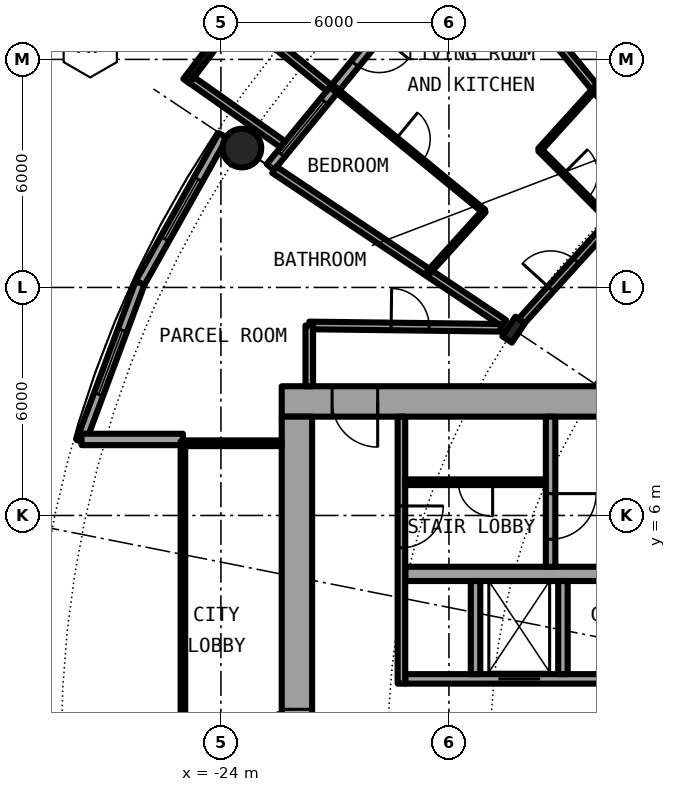
"""IFC4 building model, lengths in metres.
Left out: names, types, materials, properties, quantities, classifications, styles, units other than length and angle.
Written with IfcOpenShell. Run it as: python <this file> out.ifc"""

import sys

from ifc_helpers import new_model, si_unit, direction, frame, frame_2d, origin, origin_2d, place, context, subcontext, project, spatial, rectangle, circle, hollow_circle, i_section, extrude, element, fill, save


model = new_model("IFC4")
c1 = context("Model", 3, precision=1e-05, world=origin(), true_north=direction((0.0, 1.0)))
c2 = subcontext(c1, "Body", "Model", "MODEL_VIEW")
j1 = project(units=[si_unit("LENGTHUNIT", "METRE"), si_unit("PLANEANGLEUNIT", "RADIAN")], contexts=[c1])
p1 = place(None, origin())
s1 = spatial("IfcSite", under=j1, at=p1, CompositionType="ELEMENT")
p2 = place(p1, origin())
s2 = spatial("IfcBuilding", under=s1, at=p2, CompositionType="ELEMENT")
p3 = place(p2, frame((0.0, 0.0, 31.95)))
s3 = spatial("IfcBuildingStorey", under=s2, at=p3, CompositionType="ELEMENT", Elevation=31.95)
p4 = place(p3, frame((-23.448, 15.667, 0.0), z_axis=(0.0, 0.0, 1.0), x_axis=(1.0, 0.0, 0.0)))
e1 = element("IfcColumn", 1, at=p4, inside=s3, PredefinedType="COLUMN", context=c2, shape_type="SweptSolid", body=[
    extrude(hollow_circle(Radius=0.508, WallThickness=0.05, at=origin_2d()), origin(), (0.0, 0.0, 1.0), 3.05),
])
p5 = place(p3, frame((-16.297, 10.889, 0.0), z_axis=(0.0, 0.0, 1.0), x_axis=(-0.831469612303, 0.55557023302, 0.0)))
e2 = element("IfcColumn", 2, at=p5, inside=s3, PredefinedType="COLUMN", context=c2, shape_type="SweptSolid", body=[
    extrude(i_section(OverallWidth=0.305, OverallDepth=0.62, WebThickness=0.021, FlangeThickness=0.04, FilletRadius=0.027, at=origin_2d()), origin(), (0.0, 0.0, 1.0), 3.05),
])
p6 = place(p3, frame((-19.304, 19.304, 0.0), z_axis=(0.0, 0.0, 1.0), x_axis=(-0.634382322723, -0.773019449054, 0.0)))
e3 = element("IfcWall", 3, at=p6, inside=s3, PredefinedType="SOLIDWALL", context=c2, shape_type="SweptSolid", body=[
    extrude(rectangle(XDim=5.352, YDim=0.25, at=frame_2d((2.676, 0.0))), origin(), (0.0, 0.0, 1.0), 2.7),
])
p7 = place(p6, frame((0.841, 0.0, 0.0)))
e4 = element("IfcOpeningElement", 4, at=p7, cuts=e3, PredefinedType="OPENING", context=c2, shape_type="SweptSolid", body=[
    extrude(rectangle(XDim=1.0, YDim=2.2, at=frame_2d((0.5, 1.1))), frame((0.0, 0.135, 0.0), z_axis=(0.0, -1.0, 0.0), x_axis=(1.0, 0.0, 0.0)), (0.0, 0.0, 1.0), 0.27),
])
p8 = place(p6, frame((3.111, 0.0, 0.3)))
e5 = element("IfcOpeningElement", 5, at=p8, cuts=e3, PredefinedType="OPENING", context=c2, shape_type="SweptSolid", body=[
    extrude(rectangle(XDim=1.8, YDim=2.1, at=frame_2d((0.9, 1.05))), frame((0.0, 0.135, 0.0), z_axis=(0.0, -1.0, 0.0), x_axis=(1.0, 0.0, 0.0)), (0.0, 0.0, 1.0), 0.27),
])
p9 = place(p3, frame((-23.497, 19.289, -0.03), z_axis=(0.0, 0.0, 1.0), x_axis=(-0.60418752353, -0.796842165306, 0.0)))
e6 = element("IfcWall", 6, at=p9, inside=s3, PredefinedType="SOLIDWALL", context=c2, shape_type="SweptSolid", body=[
    extrude(rectangle(XDim=2.337, YDim=0.2, at=frame_2d((1.168, 0.0))), origin(), (0.0, 0.0, 1.0), 2.73),
])
p10 = place(p9, frame((0.128, 0.0, 0.33)))
e7 = element("IfcOpeningElement", 7, at=p10, cuts=e6, PredefinedType="OPENING", context=c2, shape_type="SweptSolid", body=[
    extrude(circle(Radius=1.04, at=frame_2d((1.04, 1.04))), frame((0.0, 0.11, 0.0), z_axis=(0.0, -1.0, 0.0), x_axis=(1.0, 0.0, 0.0)), (0.0, 0.0, 1.0), 0.22),
])
p11 = place(p3, frame((-21.155, 17.246, -0.03), z_axis=(0.0, 0.0, 1.0), x_axis=(-0.775179004516, 0.631741648902, 0.0)))
e8 = element("IfcWall", 8, at=p11, inside=s3, PredefinedType="SOLIDWALL", context=c2, shape_type="SweptSolid", body=[
    extrude(rectangle(XDim=3.006, YDim=0.2, at=frame_2d((1.503, 0.0))), origin(), (0.0, 0.0, 1.0), 2.73),
])
p12 = place(p3, frame((-22.37, 15.765, -0.03), z_axis=(0.0, 0.0, 1.0), x_axis=(-0.817256123454, 0.576274612209, 0.0)))
e9 = element("IfcWall", 9, at=p12, inside=s3, PredefinedType="SOLIDWALL", context=c2, shape_type="SweptSolid", body=[
    extrude(rectangle(XDim=2.933, YDim=0.2, at=frame_2d((1.466, 0.0))), origin(), (0.0, 0.0, 1.0), 2.73),
])
p13 = place(p3, frame((-23.946, 16.0, 0.0), z_axis=(0.0, 0.0, 1.0), x_axis=(-0.489696356642, -0.871893042919, 0.0)))
e10 = element("IfcWall", 10, at=p13, inside=s3, PredefinedType="SOLIDWALL", context=c2, shape_type="SweptSolid", body=[
    extrude(rectangle(XDim=4.454, YDim=0.25, at=frame_2d((2.227, 0.0))), origin(), (0.0, 0.0, 1.0), 2.7),
])
p14 = place(p13, frame((1.327, 0.0, 0.3)))
e11 = element("IfcOpeningElement", 11, at=p14, cuts=e10, PredefinedType="OPENING", context=c2, shape_type="SweptSolid", body=[
    extrude(rectangle(XDim=1.8, YDim=2.1, at=frame_2d((0.9, 1.05))), frame((0.0, 0.135, 0.0), z_axis=(0.0, -1.0, 0.0), x_axis=(1.0, 0.0, 0.0)), (0.0, 0.0, 1.0), 0.27),
])
p15 = place(p3, frame((-26.127, 12.117, 0.0), z_axis=(0.0, 0.0, 1.0), x_axis=(-0.349247811493, -0.937030397675, 0.0)))
e12 = element("IfcWall", 12, at=p15, inside=s3, PredefinedType="SOLIDWALL", context=c2, shape_type="SweptSolid", body=[
    extrude(rectangle(XDim=4.452, YDim=0.25, at=frame_2d((2.226, 0.0))), origin(), (0.0, 0.0, 1.0), 2.7),
])
p16 = place(p15, frame((1.327, 0.0, 0.3)))
e13 = element("IfcOpeningElement", 13, at=p16, cuts=e12, PredefinedType="OPENING", context=c2, shape_type="SweptSolid", body=[
    extrude(rectangle(XDim=1.8, YDim=2.1, at=frame_2d((0.9, 1.05))), frame((0.0, 0.135, 0.0), z_axis=(0.0, -1.0, 0.0), x_axis=(1.0, 0.0, 0.0)), (0.0, 0.0, 1.0), 0.27),
])
p17 = place(p3, frame((-25.0, 8.0, 0.0), z_axis=(0.0, 0.0, 1.0), x_axis=(-1.0, 0.0, 0.0)))
e14 = element("IfcWall", 14, at=p17, inside=s3, PredefinedType="SOLIDWALL", context=c2, shape_type="SweptSolid", body=[
    extrude(rectangle(XDim=2.667, YDim=0.3, at=frame_2d((1.333, 0.0))), origin(), (0.0, 0.0, 1.0), 2.7),
])
p18 = place(p3, frame((-8.2, 9.0, 0.0), z_axis=(0.0, 0.0, 1.0), x_axis=(-1.0, 0.0, 0.0)))
e15 = element("IfcWall", 15, at=p18, inside=s3, PredefinedType="SHEAR", context=c2, shape_type="SweptSolid", body=[
    extrude(rectangle(XDim=14.2, YDim=0.8, at=frame_2d((7.1, 0.0))), origin(), (0.0, 0.0, 1.0), 3.05),
])
p19 = place(p18, frame((11.675, 0.0, 0.0)))
e16 = element("IfcOpeningElement", 16, at=p19, cuts=e15, PredefinedType="OPENING", context=c2, shape_type="SweptSolid", body=[
    extrude(rectangle(XDim=1.2, YDim=2.3, at=frame_2d((0.6, 1.15))), frame((0.0, 0.41, 0.0), z_axis=(0.0, -1.0, 0.0), x_axis=(1.0, 0.0, 0.0)), (0.0, 0.0, 1.0), 0.82),
])
p20 = place(p3, frame((-22.0, -8.6, 0.0), z_axis=(0.0, 0.0, 1.0), x_axis=(0.0, 1.0, 0.0)))
e17 = element("IfcWall", 17, at=p20, inside=s3, PredefinedType="SHEAR", context=c2, shape_type="SweptSolid", body=[
    extrude(rectangle(XDim=17.2, YDim=0.8, at=frame_2d((8.6, 0.0))), origin(), (0.0, 0.0, 1.0), 3.05),
])
p21 = place(p20, frame((7.7, 0.0, 0.0)))
e18 = element("IfcOpeningElement", 18, at=p21, cuts=e17, PredefinedType="OPENING", context=c2, shape_type="SweptSolid", body=[
    extrude(rectangle(XDim=1.8, YDim=2.3, at=frame_2d((0.9, 1.15))), frame((0.0, 0.41, 0.0), z_axis=(0.0, -1.0, 0.0), x_axis=(1.0, 0.0, 0.0)), (0.0, 0.0, 1.0), 0.82),
])
p22 = place(p3, frame((-19.15, 1.7, 0.0), z_axis=(0.0, 0.0, 1.0), x_axis=(1.0, 0.0, 0.0)))
e19 = element("IfcWall", 19, at=p22, inside=s3, PredefinedType="SHEAR", context=c2, shape_type="SweptSolid", body=[
    extrude(rectangle(XDim=10.15, YDim=0.25, at=frame_2d((5.075, 0.0))), origin(), (0.0, 0.0, 1.0), 3.05),
])
p23 = place(p22, frame((2.45, 0.0, 0.0)))
e20 = element("IfcOpeningElement", 20, at=p23, cuts=e19, PredefinedType="OPENING", context=c2, shape_type="SweptSolid", body=[
    extrude(rectangle(XDim=1.1, YDim=2.3, at=frame_2d((0.55, 1.15))), frame((0.0, 0.135, 0.0), z_axis=(0.0, -1.0, 0.0), x_axis=(1.0, 0.0, 0.0)), (0.0, 0.0, 1.0), 0.27),
])
p24 = place(p22, frame((8.087, 0.0, 0.0)))
e21 = element("IfcOpeningElement", 21, at=p24, cuts=e19, PredefinedType="OPENING", context=c2, shape_type="SweptSolid", body=[
    extrude(rectangle(XDim=0.9, YDim=2.3, at=frame_2d((0.45, 1.15))), frame((0.0, 0.135, 0.0), z_axis=(0.0, -1.0, 0.0), x_axis=(1.0, 0.0, 0.0)), (0.0, 0.0, 1.0), 0.27),
])
p25 = place(p22, frame((5.075, 0.0, 0.0)))
e22 = element("IfcOpeningElement", 22, at=p25, cuts=e19, PredefinedType="OPENING", context=c2, shape_type="SweptSolid", body=[
    extrude(rectangle(XDim=0.9, YDim=2.3, at=frame_2d((0.45, 1.15))), frame((0.0, 0.135, 0.0), z_axis=(0.0, -1.0, 0.0), x_axis=(1.0, 0.0, 0.0)), (0.0, 0.0, 1.0), 0.27),
])
p26 = place(p3, frame((-9.0, 4.462, 0.0), z_axis=(0.0, 0.0, 1.0), x_axis=(-1.0, 0.0, 0.0)))
e23 = element("IfcWall", 23, at=p26, inside=s3, PredefinedType="SHEAR", context=c2, shape_type="SweptSolid", body=[
    extrude(rectangle(XDim=10.15, YDim=0.375, at=frame_2d((5.075, 0.0))), origin(), (0.0, 0.0, 1.0), 3.05),
])
p27 = place(p3, frame((-15.325, 8.6, 0.0), z_axis=(0.0, 0.0, 1.0), x_axis=(0.0, -1.0, 0.0)))
e24 = element("IfcWall", 24, at=p27, inside=s3, PredefinedType="SHEAR", context=c2, shape_type="SweptSolid", body=[
    extrude(rectangle(XDim=3.95, YDim=0.25, at=frame_2d((1.975, 0.0))), origin(), (0.0, 0.0, 1.0), 3.05),
])
p28 = place(p27, frame((2.025, 0.0, 0.0)))
e25 = element("IfcOpeningElement", 25, at=p28, cuts=e24, PredefinedType="OPENING", context=c2, shape_type="SweptSolid", body=[
    extrude(rectangle(XDim=1.2, YDim=2.3, at=frame_2d((0.6, 1.15))), frame((0.0, 0.135, 0.0), z_axis=(0.0, -1.0, 0.0), x_axis=(1.0, 0.0, 0.0)), (0.0, 0.0, 1.0), 0.27),
])
for number, where, z_axis, x_axis in (
    (26, (-15.0, 1.825, 0.0), (0.0, 0.0, 1.0), (0.0, 1.0, 0.0)),
    (27, (-17.3, 1.825, 0.0), (0.0, 0.0, 1.0), (0.0, 1.0, 0.0)),
):
    element("IfcWall", number, at=place(p3, frame(where, z_axis=z_axis, x_axis=x_axis)), inside=s3, PredefinedType="SOLIDWALL", context=c2, shape_type="SweptSolid", body=[
        extrude(rectangle(XDim=2.45, YDim=0.25, at=frame_2d((1.225, 0.0))), origin(), (0.0, 0.0, 1.0), 2.7),
    ])
p29 = place(p3, frame((-19.25, 8.6, 0.0), z_axis=(0.0, 0.0, 1.0), x_axis=(0.0, -1.0, 0.0)))
e28 = element("IfcWall", 28, at=p29, inside=s3, PredefinedType="SOLIDWALL", context=c2, shape_type="SweptSolid", body=[
    extrude(rectangle(XDim=7.025, YDim=0.2, at=frame_2d((3.513, 0.0))), origin(), (0.0, 0.0, 1.0), 2.7),
])
p30 = place(p29, frame((2.35, 0.0, 0.0)))
e29 = element("IfcOpeningElement", 29, at=p30, cuts=e28, PredefinedType="OPENING", context=c2, shape_type="SweptSolid", body=[
    extrude(rectangle(XDim=1.1, YDim=2.3, at=frame_2d((0.55, 1.15))), frame((0.0, 0.11, 0.0), z_axis=(0.0, -1.0, 0.0), x_axis=(1.0, 0.0, 0.0)), (0.0, 0.0, 1.0), 0.22),
])
p31 = place(p3, frame((-15.45, 6.875, 0.0), z_axis=(0.0, 0.0, 1.0), x_axis=(-1.0, 0.0, 0.0)))
e30 = element("IfcWall", 30, at=p31, inside=s3, PredefinedType="PARTITIONING", context=c2, shape_type="SweptSolid", body=[
    extrude(rectangle(XDim=3.7, YDim=0.15, at=frame_2d((1.85, 0.0))), origin(), (0.0, 0.0, 1.0), 2.7),
])
p32 = place(p31, frame((1.4, 0.0, 0.0)))
e31 = element("IfcOpeningElement", 31, at=p32, cuts=e30, PredefinedType="OPENING", context=c2, shape_type="SweptSolid", body=[
    extrude(rectangle(XDim=0.9, YDim=2.3, at=frame_2d((0.45, 1.15))), frame((0.0, 0.085, 0.0), z_axis=(0.0, -1.0, 0.0), x_axis=(1.0, 0.0, 0.0)), (0.0, 0.0, 1.0), 0.17),
])
p33 = place(p3, frame((-22.4, 7.9, 0.0), z_axis=(0.0, 0.0, 1.0), x_axis=(-1.0, 0.0, 0.0)))
e32 = element("IfcWall", 32, at=p33, inside=s3, PredefinedType="PARTITIONING", context=c2, shape_type="SweptSolid", body=[
    extrude(rectangle(XDim=2.54, YDim=0.15, at=frame_2d((1.27, 0.0))), origin(), (0.0, 0.0, 1.0), 2.7),
])
p34 = place(p3, frame((-25.0, 7.95, 0.0), z_axis=(0.0, 0.0, 1.0), x_axis=(0.0, -1.0, 0.0)))
e33 = element("IfcWall", 33, at=p34, inside=s3, PredefinedType="PARTITIONING", context=c2, shape_type="SweptSolid", body=[
    extrude(rectangle(XDim=15.9, YDim=0.12, at=frame_2d((7.95, 0.0))), origin(), (0.0, 0.0, 1.0), 2.7),
])
p35 = place(p34, frame((0.95, 0.0, 0.1)))
e34 = element("IfcOpeningElement", 34, at=p35, cuts=e33, PredefinedType="OPENING", context=c2, shape_type="SweptSolid", body=[
    extrude(rectangle(XDim=14.0, YDim=2.35, at=frame_2d((7.0, 1.175))), frame((0.0, 0.07, 0.0), z_axis=(0.0, -1.0, 0.0), x_axis=(1.0, 0.0, 0.0)), (0.0, 0.0, 1.0), 0.14),
])
p36 = place(p3, frame((-22.595, 15.097, 0.0), z_axis=(0.0, 0.0, 1.0), x_axis=(0.831465568067, -0.555576285599, 0.0)))
e35 = element("IfcWall", 35, at=p36, inside=s3, PredefinedType="PARTITIONING", context=c2, shape_type="SweptSolid", body=[
    extrude(rectangle(XDim=7.264, YDim=0.2, at=frame_2d((3.632, 0.0))), origin(), (0.0, 0.0, 1.0), 2.7),
])
p37 = place(p3, frame((-21.012, 17.233, 0.0), z_axis=(0.0, 0.0, 1.0), x_axis=(0.77326214499, -0.634086472908, 0.0)))
e36 = element("IfcWall", 36, at=p37, inside=s3, PredefinedType="PARTITIONING", context=c2, shape_type="SweptSolid", body=[
    extrude(rectangle(XDim=5.089, YDim=0.1, at=frame_2d((2.544, 0.0))), origin(), (0.0, 0.0, 1.0), 2.7),
])
p38 = place(p37, frame((2.094, 0.0, 0.0)))
e37 = element("IfcOpeningElement", 37, at=p38, cuts=e36, PredefinedType="OPENING", context=c2, shape_type="SweptSolid", body=[
    extrude(rectangle(XDim=0.9, YDim=2.3, at=frame_2d((0.45, 1.15))), frame((0.0, 0.06, 0.0), z_axis=(0.0, -1.0, 0.0), x_axis=(1.0, 0.0, 0.0)), (0.0, 0.0, 1.0), 0.12),
])
p39 = place(p3, frame((-17.24, 21.007, 0.0), z_axis=(0.0, 0.0, 1.0), x_axis=(0.634381303318, -0.773020285633, 0.0)))
e38 = element("IfcWall", 38, at=p39, inside=s3, PredefinedType="PARTITIONING", context=c2, shape_type="SweptSolid", body=[
    extrude(rectangle(XDim=7.576, YDim=0.2, at=frame_2d((3.788, 0.0))), origin(), (0.0, 0.0, 1.0), 2.7),
])
p40 = place(p3, frame((-15.612, 15.622, 0.0), z_axis=(0.0, 0.0, 1.0), x_axis=(0.706741540154, -0.707471833659, 0.0)))
e39 = element("IfcWall", 39, at=p40, inside=s3, PredefinedType="PARTITIONING", context=c2, shape_type="SweptSolid", body=[
    extrude(rectangle(XDim=2.674, YDim=0.1, at=frame_2d((1.337, 0.0))), origin(), (0.0, 0.0, 1.0), 2.7),
])
p41 = place(p40, frame((0.887, 0.0, 0.0)))
e40 = element("IfcOpeningElement", 40, at=p41, cuts=e39, PredefinedType="OPENING", context=c2, shape_type="SweptSolid", body=[
    extrude(rectangle(XDim=0.9, YDim=2.3, at=frame_2d((0.45, 1.15))), frame((0.0, 0.06, 0.0), z_axis=(0.0, -1.0, 0.0), x_axis=(1.0, 0.0, 0.0)), (0.0, 0.0, 1.0), 0.12),
])
p42 = place(p3, frame((-21.675, 11.0, 0.0), z_axis=(0.0, 0.0, 1.0), x_axis=(0.99992425795, -0.012307654658, 0.0)))
e41 = element("IfcWall", 41, at=p42, inside=s3, PredefinedType="PARTITIONING", context=c2, shape_type="SweptSolid", body=[
    extrude(rectangle(XDim=5.039, YDim=0.2, at=frame_2d((2.519, 0.0))), origin(), (0.0, 0.0, 1.0), 2.7),
])
p43 = place(p42, frame((2.155, 0.0, 0.0)))
e42 = element("IfcOpeningElement", 42, at=p43, cuts=e41, PredefinedType="OPENING", context=c2, shape_type="SweptSolid", body=[
    extrude(rectangle(XDim=1.0, YDim=2.3, at=frame_2d((0.5, 1.15))), frame((0.0, 0.11, 0.0), z_axis=(0.0, -1.0, 0.0), x_axis=(1.0, 0.0, 0.0)), (0.0, 0.0, 1.0), 0.22),
])
p44 = place(p3, frame((-16.193, 11.003, 0.0), z_axis=(0.0, 0.0, 1.0), x_axis=(0.671514934772, 0.740991020444, 0.0)))
e43 = element("IfcWall", 43, at=p44, inside=s3, PredefinedType="PARTITIONING", context=c2, shape_type="SweptSolid", body=[
    extrude(rectangle(XDim=5.598, YDim=0.2, at=frame_2d((2.799, 0.0))), origin(), (0.0, 0.0, 1.0), 2.38),
])
p45 = place(p44, frame((1.293, 0.0, 0.0)))
e44 = element("IfcOpeningElement", 44, at=p45, cuts=e43, PredefinedType="OPENING", context=c2, shape_type="SweptSolid", body=[
    extrude(rectangle(XDim=1.0, YDim=2.3, at=frame_2d((0.5, 1.15))), frame((0.0, 0.11, 0.0), z_axis=(0.0, -1.0, 0.0), x_axis=(1.0, 0.0, 0.0)), (0.0, 0.0, 1.0), 0.22),
])
p46 = place(p3, frame((-21.675, 9.4, 0.0), z_axis=(0.0, 0.0, 1.0), x_axis=(0.0, 1.0, 0.0)))
e45 = element("IfcWall", 45, at=p46, inside=s3, PredefinedType="PARTITIONING", context=c2, shape_type="SweptSolid", body=[
    extrude(rectangle(XDim=1.6, YDim=0.2, at=frame_2d((0.8, 0.0))), origin(), (0.0, 0.0, 1.0), 2.7),
])
for number, where, z_axis, x_axis in (
    (46, (-18.538, 12.394, 0.0), (0.0, 0.0, 1.0), (0.672, 0.741, 0.0)),
    (47, (-15.613, 15.621, 0.0), (0.0, 0.0, 1.0), (0.672, 0.741, 0.0)),
):
    element("IfcWall", number, at=place(p3, frame(where, z_axis=z_axis, x_axis=x_axis)), inside=s3, PredefinedType="PARTITIONING", context=c2, shape_type="SweptSolid", body=[
        extrude(rectangle(XDim=2.183, YDim=0.1, at=frame_2d((1.091, 0.0))), origin(), (0.0, 0.0, 1.0), 2.7),
    ])
p47 = place(p3, frame((-14.147, 17.237, 0.0), z_axis=(0.0, 0.0, 1.0), x_axis=(0.857660741648, 0.514215958752, 0.0)))
e48 = element("IfcWall", 48, at=p47, inside=s3, PredefinedType="PARTITIONING", context=c2, shape_type="SweptSolid", body=[
    extrude(rectangle(XDim=2.182, YDim=0.1, at=frame_2d((1.091, 0.0))), origin(), (0.0, 0.0, 1.0), 2.7),
])
p48 = place(p7, origin())
e49 = element("IfcDoor", 49, at=p48, inside=s3, OperationType="SINGLE_SWING_LEFT", PredefinedType="DOOR", context=c2, shape_type="SweptSolid", body=[
    extrude(rectangle(XDim=1.0, YDim=2.2, at=frame_2d((0.5, 1.1))), frame((0.0, 0.025, 0.0), z_axis=(0.0, -1.0, 0.0), x_axis=(1.0, 0.0, 0.0)), (0.0, 0.0, 1.0), 0.05),
])
fill(e4, e49)
p49 = place(p8, origin())
e50 = element("IfcWindow", 50, at=p49, inside=s3, PartitioningType="SINGLE_PANEL", PredefinedType="WINDOW", context=c2, shape_type="SweptSolid", body=[
    extrude(rectangle(XDim=1.8, YDim=2.1, at=frame_2d((0.9, 1.05))), frame((0.0, 0.03, 0.0), z_axis=(0.0, -1.0, 0.0), x_axis=(1.0, 0.0, 0.0)), (0.0, 0.0, 1.0), 0.06),
])
fill(e5, e50)
p50 = place(p10, origin())
e51 = element("IfcWindow", 51, at=p50, inside=s3, PartitioningType="SINGLE_PANEL", PredefinedType="WINDOW", context=c2, shape_type="SweptSolid", body=[
    extrude(circle(Radius=1.04, at=frame_2d((1.04, 1.04))), frame((0.0, 0.03, 0.0), z_axis=(0.0, -1.0, 0.0), x_axis=(1.0, 0.0, 0.0)), (0.0, 0.0, 1.0), 0.06),
])
fill(e7, e51)
p51 = place(p14, origin())
e52 = element("IfcWindow", 52, at=p51, inside=s3, PartitioningType="SINGLE_PANEL", PredefinedType="WINDOW", context=c2, shape_type="SweptSolid", body=[
    extrude(rectangle(XDim=1.8, YDim=2.1, at=frame_2d((0.9, 1.05))), frame((0.0, 0.03, 0.0), z_axis=(0.0, -1.0, 0.0), x_axis=(1.0, 0.0, 0.0)), (0.0, 0.0, 1.0), 0.06),
])
fill(e11, e52)
p52 = place(p16, origin())
e53 = element("IfcWindow", 53, at=p52, inside=s3, PartitioningType="SINGLE_PANEL", PredefinedType="WINDOW", context=c2, shape_type="SweptSolid", body=[
    extrude(rectangle(XDim=1.8, YDim=2.1, at=frame_2d((0.9, 1.05))), frame((0.0, 0.03, 0.0), z_axis=(0.0, -1.0, 0.0), x_axis=(1.0, 0.0, 0.0)), (0.0, 0.0, 1.0), 0.06),
])
fill(e13, e53)
p53 = place(p23, origin())
e54 = element("IfcDoor", 54, at=p53, inside=s3, OperationType="DOUBLE_DOOR_SLIDING", PredefinedType="DOOR", context=c2, shape_type="SweptSolid", body=[
    extrude(rectangle(XDim=1.1, YDim=2.3, at=frame_2d((0.55, 1.15))), frame((0.0, 0.025, 0.0), z_axis=(0.0, -1.0, 0.0), x_axis=(1.0, 0.0, 0.0)), (0.0, 0.0, 1.0), 0.05),
])
fill(e20, e54)
p54 = place(p32, origin())
e55 = element("IfcDoor", 55, at=p54, inside=s3, OperationType="SINGLE_SWING_LEFT", PredefinedType="DOOR", context=c2, shape_type="SweptSolid", body=[
    extrude(rectangle(XDim=0.9, YDim=2.3, at=frame_2d((0.45, 1.15))), frame((0.0, 0.025, 0.0), z_axis=(0.0, -1.0, 0.0), x_axis=(1.0, 0.0, 0.0)), (0.0, 0.0, 1.0), 0.05),
])
fill(e31, e55)
p55 = place(p28, origin())
e56 = element("IfcDoor", 56, at=p55, inside=s3, OperationType="SINGLE_SWING_LEFT", PredefinedType="DOOR", context=c2, shape_type="SweptSolid", body=[
    extrude(rectangle(XDim=1.2, YDim=2.3, at=frame_2d((0.6, 1.15))), frame((0.0, 0.025, 0.0), z_axis=(0.0, -1.0, 0.0), x_axis=(1.0, 0.0, 0.0)), (0.0, 0.0, 1.0), 0.05),
])
fill(e25, e56)
p56 = place(p30, origin())
e57 = element("IfcDoor", 57, at=p56, inside=s3, OperationType="SINGLE_SWING_RIGHT", PredefinedType="DOOR", context=c2, shape_type="SweptSolid", body=[
    extrude(rectangle(XDim=1.1, YDim=2.3, at=frame_2d((0.55, 1.15))), frame((0.0, 0.025, 0.0), z_axis=(0.0, -1.0, 0.0), x_axis=(1.0, 0.0, 0.0)), (0.0, 0.0, 1.0), 0.05),
])
fill(e29, e57)
p57 = place(p19, origin())
e58 = element("IfcDoor", 58, at=p57, inside=s3, OperationType="SINGLE_SWING_LEFT", PredefinedType="DOOR", context=c2, shape_type="SweptSolid", body=[
    extrude(rectangle(XDim=1.2, YDim=2.3, at=frame_2d((0.6, 1.15))), frame((0.0, 0.025, 0.0), z_axis=(0.0, -1.0, 0.0), x_axis=(1.0, 0.0, 0.0)), (0.0, 0.0, 1.0), 0.05),
])
fill(e16, e58)
p58 = place(p21, origin())
e59 = element("IfcDoor", 59, at=p58, inside=s3, OperationType="SINGLE_SWING_LEFT", PredefinedType="DOOR", context=c2, shape_type="SweptSolid", body=[
    extrude(rectangle(XDim=1.8, YDim=2.3, at=frame_2d((0.9, 1.15))), frame((0.0, 0.025, 0.0), z_axis=(0.0, -1.0, 0.0), x_axis=(1.0, 0.0, 0.0)), (0.0, 0.0, 1.0), 0.05),
])
fill(e18, e59)
p59 = place(p35, origin())
e60 = element("IfcWindow", 60, at=p59, inside=s3, PartitioningType="SINGLE_PANEL", PredefinedType="WINDOW", context=c2, shape_type="SweptSolid", body=[
    extrude(rectangle(XDim=14.0, YDim=2.35, at=frame_2d((7.0, 1.175))), frame((0.0, 0.03, 0.0), z_axis=(0.0, -1.0, 0.0), x_axis=(1.0, 0.0, 0.0)), (0.0, 0.0, 1.0), 0.06),
])
fill(e34, e60)
p60 = place(p45, origin())
e61 = element("IfcDoor", 61, at=p60, inside=s3, OperationType="SINGLE_SWING_LEFT", PredefinedType="DOOR", context=c2, shape_type="SweptSolid", body=[
    extrude(rectangle(XDim=1.0, YDim=2.3, at=frame_2d((0.5, 1.15))), frame((0.0, 0.025, 0.0), z_axis=(0.0, -1.0, 0.0), x_axis=(1.0, 0.0, 0.0)), (0.0, 0.0, 1.0), 0.05),
])
fill(e44, e61)
p61 = place(p41, origin())
e62 = element("IfcDoor", 62, at=p61, inside=s3, OperationType="SINGLE_SWING_RIGHT", PredefinedType="DOOR", context=c2, shape_type="SweptSolid", body=[
    extrude(rectangle(XDim=0.9, YDim=2.3, at=frame_2d((0.45, 1.15))), frame((0.0, 0.025, 0.0), z_axis=(0.0, -1.0, 0.0), x_axis=(1.0, 0.0, 0.0)), (0.0, 0.0, 1.0), 0.05),
])
fill(e40, e62)
p62 = place(p38, origin())
e63 = element("IfcDoor", 63, at=p62, inside=s3, OperationType="SINGLE_SWING_RIGHT", PredefinedType="DOOR", context=c2, shape_type="SweptSolid", body=[
    extrude(rectangle(XDim=0.9, YDim=2.3, at=frame_2d((0.45, 1.15))), frame((0.0, 0.025, 0.0), z_axis=(0.0, -1.0, 0.0), x_axis=(1.0, 0.0, 0.0)), (0.0, 0.0, 1.0), 0.05),
])
fill(e37, e63)
p63 = place(p43, origin())
e64 = element("IfcDoor", 64, at=p63, inside=s3, OperationType="SINGLE_SWING_RIGHT", PredefinedType="DOOR", context=c2, shape_type="SweptSolid", body=[
    extrude(rectangle(XDim=1.0, YDim=2.3, at=frame_2d((0.5, 1.15))), frame((0.0, 0.025, 0.0), z_axis=(0.0, -1.0, 0.0), x_axis=(1.0, 0.0, 0.0)), (0.0, 0.0, 1.0), 0.05),
])
fill(e42, e64)
save(model, sys.argv[1])
